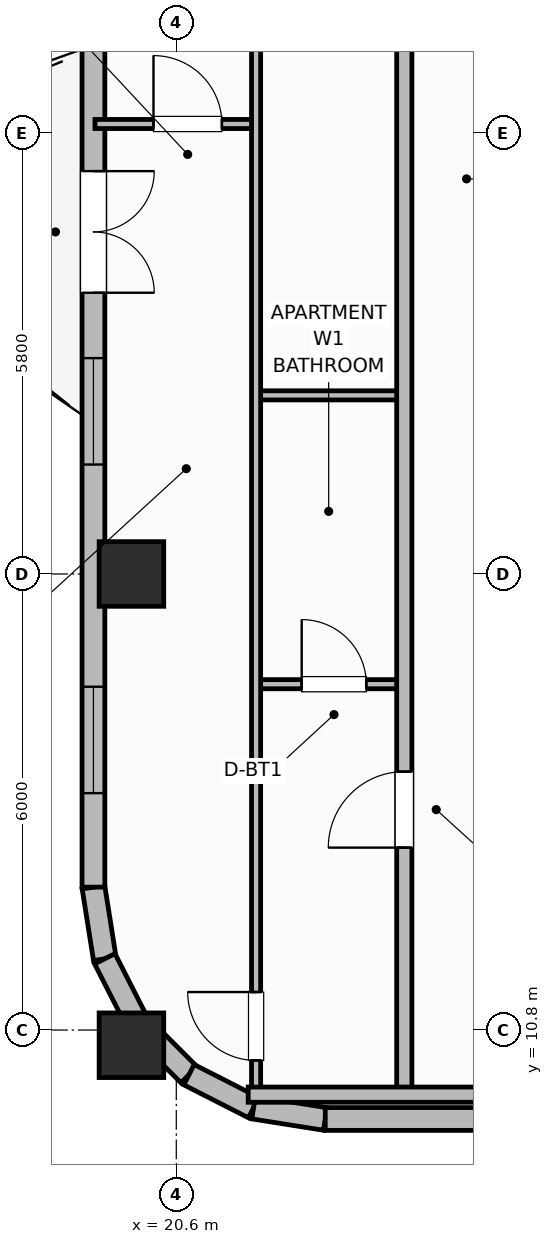
"""IFC4 building model, lengths in metres.
Left out: names, types, materials, properties, quantities, classifications, styles, units other than length and angle.
Written with IfcOpenShell. Run it as: python <this file> out.ifc"""

import sys

from ifc_helpers import new_model, si_unit, direction, frame, frame_2d, origin, origin_2d, place, context, subcontext, project, spatial, rectangle, extrude, element, fill, save


model = new_model("IFC4")
c1 = context("Model", 3, precision=1e-05, world=origin(), true_north=direction((0.0, 1.0)))
c2 = subcontext(c1, "Body", "Model", "MODEL_VIEW")
j1 = project(units=[si_unit("LENGTHUNIT", "METRE"), si_unit("PLANEANGLEUNIT", "RADIAN")], contexts=[c1])
p1 = place(None, origin())
s1 = spatial("IfcSite", under=j1, at=p1, CompositionType="ELEMENT")
p2 = place(p1, origin())
s2 = spatial("IfcBuilding", under=s1, at=p2, CompositionType="ELEMENT")
p3 = place(p2, frame((0.0, 0.0, 248.0)))
s3 = spatial("IfcBuildingStorey", under=s2, at=p3, CompositionType="ELEMENT", Elevation=248.0)
for number, where, z_axis, x_axis in (
    (1, (20.01, 10.6, 0.0), (0.0, 0.0, 1.0), (1.0, 0.0, 0.0)),
    (2, (20.01, 16.8, 0.0), (0.0, 0.0, 1.0), (1.0, 0.0, 0.0)),
):
    element("IfcColumn", number, at=place(p3, frame(where, z_axis=z_axis, x_axis=x_axis)), inside=s3, PredefinedType="COLUMN", context=c2, shape_type="SweptSolid", body=[
        extrude(rectangle(XDim=0.85, YDim=0.85, at=origin_2d()), origin(), (0.0, 0.0, 1.0), 3.7),
    ])
p4 = place(p3, frame((19.51, 12.68, 0.0), z_axis=(0.0, 0.0, 1.0), x_axis=(0.156343617883, -0.987702725088, 0.0)))
e3 = element("IfcWall", 3, at=p4, inside=s3, PredefinedType="SOLIDWALL", context=c2, shape_type="SweptSolid", body=[
    extrude(rectangle(XDim=0.954, YDim=0.3, at=frame_2d((0.477, 0.0))), origin(), (0.0, 0.0, 1.0), 2.73),
])
for number, where, z_axis, x_axis in (
    (4, (19.659, 11.738, 0.0), (0.0, 0.0, 1.0), (0.454, -0.891, 0.0)),
    (5, (20.093, 10.887, 0.0), (0.0, 0.0, 1.0), (0.707, -0.707, 0.0)),
):
    element("IfcWall", number, at=place(p3, frame(where, z_axis=z_axis, x_axis=x_axis)), inside=s3, PredefinedType="SOLIDWALL", context=c2, shape_type="SweptSolid", body=[
        extrude(rectangle(XDim=0.954, YDim=0.3, at=frame_2d((0.477, 0.0))), origin(), (0.0, 0.0, 1.0), 2.73),
    ])
p5 = place(p3, frame((20.767, 10.212, 0.0), z_axis=(0.0, 0.0, 1.0), x_axis=(0.891023873617, -0.45395644796, 0.0)))
e6 = element("IfcWall", 6, at=p5, inside=s3, PredefinedType="SOLIDWALL", context=c2, shape_type="SweptSolid", body=[
    extrude(rectangle(XDim=0.954, YDim=0.3, at=frame_2d((0.477, 0.0))), origin(), (0.0, 0.0, 1.0), 2.73),
])
p6 = place(p3, frame((21.617, 9.779, 0.0), z_axis=(0.0, 0.0, 1.0), x_axis=(0.987669453596, -0.156553666304, 0.0)))
e7 = element("IfcWall", 7, at=p6, inside=s3, PredefinedType="SOLIDWALL", context=c2, shape_type="SweptSolid", body=[
    extrude(rectangle(XDim=0.954, YDim=0.3, at=frame_2d((0.477, 0.0))), origin(), (0.0, 0.0, 1.0), 2.73),
])
p7 = place(p3, frame((22.56, 9.63, 0.0), z_axis=(0.0, 0.0, 1.0), x_axis=(1.0, 0.0, 0.0)))
e8 = element("IfcWall", 8, at=p7, inside=s3, PredefinedType="SOLIDWALL", context=c2, shape_type="SweptSolid", body=[
    extrude(rectangle(XDim=33.28, YDim=0.3, at=frame_2d((16.64, 0.0))), origin(), (0.0, 0.0, 1.0), 2.73),
])
p8 = place(p7, frame((4.311, 0.0, 0.76)))
e9 = element("IfcOpeningElement", 9, at=p8, cuts=e8, PredefinedType="OPENING", context=c2, shape_type="SweptSolid", body=[
    extrude(rectangle(XDim=1.4, YDim=1.85, at=frame_2d((0.7, 0.925))), frame((0.0, 0.16, 0.0), z_axis=(0.0, -1.0, 0.0), x_axis=(1.0, 0.0, 0.0)), (0.0, 0.0, 1.0), 0.32),
])
p9 = place(p7, frame((7.218, 0.0, 0.76)))
e10 = element("IfcOpeningElement", 10, at=p9, cuts=e8, PredefinedType="OPENING", context=c2, shape_type="SweptSolid", body=[
    extrude(rectangle(XDim=1.4, YDim=1.85, at=frame_2d((0.7, 0.925))), frame((0.0, 0.16, 0.0), z_axis=(0.0, -1.0, 0.0), x_axis=(1.0, 0.0, 0.0)), (0.0, 0.0, 1.0), 0.32),
])
p10 = place(p7, frame((9.775, 0.0, 0.76)))
e11 = element("IfcOpeningElement", 11, at=p10, cuts=e8, PredefinedType="OPENING", context=c2, shape_type="SweptSolid", body=[
    extrude(rectangle(XDim=1.4, YDim=1.85, at=frame_2d((0.7, 0.925))), frame((0.0, 0.16, 0.0), z_axis=(0.0, -1.0, 0.0), x_axis=(1.0, 0.0, 0.0)), (0.0, 0.0, 1.0), 0.32),
])
p11 = place(p7, frame((14.083, 0.0, 0.76)))
e12 = element("IfcOpeningElement", 12, at=p11, cuts=e8, PredefinedType="OPENING", context=c2, shape_type="SweptSolid", body=[
    extrude(rectangle(XDim=1.4, YDim=1.85, at=frame_2d((0.7, 0.925))), frame((0.0, 0.16, 0.0), z_axis=(0.0, -1.0, 0.0), x_axis=(1.0, 0.0, 0.0)), (0.0, 0.0, 1.0), 0.32),
])
p12 = place(p7, frame((15.94, 0.0, 0.76)))
e13 = element("IfcOpeningElement", 13, at=p12, cuts=e8, PredefinedType="OPENING", context=c2, shape_type="SweptSolid", body=[
    extrude(rectangle(XDim=1.4, YDim=1.85, at=frame_2d((0.7, 0.925))), frame((0.0, 0.16, 0.0), z_axis=(0.0, -1.0, 0.0), x_axis=(1.0, 0.0, 0.0)), (0.0, 0.0, 1.0), 0.32),
])
p13 = place(p7, frame((17.797, 0.0, 0.76)))
e14 = element("IfcOpeningElement", 14, at=p13, cuts=e8, PredefinedType="OPENING", context=c2, shape_type="SweptSolid", body=[
    extrude(rectangle(XDim=1.4, YDim=1.85, at=frame_2d((0.7, 0.925))), frame((0.0, 0.16, 0.0), z_axis=(0.0, -1.0, 0.0), x_axis=(1.0, 0.0, 0.0)), (0.0, 0.0, 1.0), 0.32),
])
p14 = place(p7, frame((22.104, 0.0, 0.76)))
e15 = element("IfcOpeningElement", 15, at=p14, cuts=e8, PredefinedType="OPENING", context=c2, shape_type="SweptSolid", body=[
    extrude(rectangle(XDim=1.4, YDim=1.85, at=frame_2d((0.7, 0.925))), frame((0.0, 0.16, 0.0), z_axis=(0.0, -1.0, 0.0), x_axis=(1.0, 0.0, 0.0)), (0.0, 0.0, 1.0), 0.32),
])
p15 = place(p7, frame((24.662, 0.0, 0.76)))
e16 = element("IfcOpeningElement", 16, at=p15, cuts=e8, PredefinedType="OPENING", context=c2, shape_type="SweptSolid", body=[
    extrude(rectangle(XDim=1.4, YDim=1.85, at=frame_2d((0.7, 0.925))), frame((0.0, 0.16, 0.0), z_axis=(0.0, -1.0, 0.0), x_axis=(1.0, 0.0, 0.0)), (0.0, 0.0, 1.0), 0.32),
])
p16 = place(p7, frame((27.569, 0.0, 0.76)))
e17 = element("IfcOpeningElement", 17, at=p16, cuts=e8, PredefinedType="OPENING", context=c2, shape_type="SweptSolid", body=[
    extrude(rectangle(XDim=1.4, YDim=1.85, at=frame_2d((0.7, 0.925))), frame((0.0, 0.16, 0.0), z_axis=(0.0, -1.0, 0.0), x_axis=(1.0, 0.0, 0.0)), (0.0, 0.0, 1.0), 0.32),
])
p17 = place(p3, frame((19.51, 23.8, 0.0), z_axis=(0.0, 0.0, 1.0), x_axis=(0.0, -1.0, 0.0)))
e18 = element("IfcWall", 18, at=p17, inside=s3, PredefinedType="SOLIDWALL", context=c2, shape_type="SweptSolid", body=[
    extrude(rectangle(XDim=11.12, YDim=0.3, at=frame_2d((5.56, 0.0))), origin(), (0.0, 0.0, 1.0), 2.73),
])
p18 = place(p17, frame((1.7, 0.0, 0.0)))
e19 = element("IfcOpeningElement", 19, at=p18, cuts=e18, PredefinedType="OPENING", context=c2, shape_type="SweptSolid", body=[
    extrude(rectangle(XDim=1.6, YDim=2.1, at=frame_2d((0.8, 1.05))), frame((0.0, 0.16, 0.0), z_axis=(0.0, -1.0, 0.0), x_axis=(1.0, 0.0, 0.0)), (0.0, 0.0, 1.0), 0.32),
])
p19 = place(p17, frame((4.16, 0.0, 0.76)))
e20 = element("IfcOpeningElement", 20, at=p19, cuts=e18, PredefinedType="OPENING", context=c2, shape_type="SweptSolid", body=[
    extrude(rectangle(XDim=1.4, YDim=1.85, at=frame_2d((0.7, 0.925))), frame((0.0, 0.16, 0.0), z_axis=(0.0, -1.0, 0.0), x_axis=(1.0, 0.0, 0.0)), (0.0, 0.0, 1.0), 0.32),
])
p20 = place(p17, frame((8.483, 0.0, 0.76)))
e21 = element("IfcOpeningElement", 21, at=p20, cuts=e18, PredefinedType="OPENING", context=c2, shape_type="SweptSolid", body=[
    extrude(rectangle(XDim=1.4, YDim=1.85, at=frame_2d((0.7, 0.925))), frame((0.0, 0.16, 0.0), z_axis=(0.0, -1.0, 0.0), x_axis=(1.0, 0.0, 0.0)), (0.0, 0.0, 1.0), 0.32),
])
p21 = place(p3, frame((21.65, 15.35, 0.0), z_axis=(0.0, 0.0, 1.0), x_axis=(1.0, 0.0, 0.0)))
e22 = element("IfcWall", 22, at=p21, inside=s3, PredefinedType="PARTITIONING", context=c2, shape_type="SweptSolid", body=[
    extrude(rectangle(XDim=1.95, YDim=0.12, at=frame_2d((0.975, 0.0))), origin(), (0.0, 0.0, 1.0), 2.56),
])
p22 = place(p21, frame((0.6, 0.0, 0.0)))
e23 = element("IfcOpeningElement", 23, at=p22, cuts=e22, PredefinedType="OPENING", context=c2, shape_type="SweptSolid", body=[
    extrude(rectangle(XDim=0.85, YDim=2.1, at=frame_2d((0.425, 1.05))), frame((0.0, 0.07, 0.0), z_axis=(0.0, -1.0, 0.0), x_axis=(1.0, 0.0, 0.0)), (0.0, 0.0, 1.0), 0.14),
])
p23 = place(p3, frame((21.65, 19.15, 0.0), z_axis=(0.0, 0.0, 1.0), x_axis=(1.0, 0.0, 0.0)))
e24 = element("IfcWall", 24, at=p23, inside=s3, PredefinedType="PARTITIONING", context=c2, shape_type="SweptSolid", body=[
    extrude(rectangle(XDim=1.95, YDim=0.12, at=frame_2d((0.975, 0.0))), origin(), (0.0, 0.0, 1.0), 2.56),
])
p24 = place(p3, frame((19.53, 22.72, 0.0), z_axis=(0.0, 0.0, 1.0), x_axis=(1.0, 0.0, 0.0)))
e25 = element("IfcWall", 25, at=p24, inside=s3, PredefinedType="PARTITIONING", context=c2, shape_type="SweptSolid", body=[
    extrude(rectangle(XDim=2.12, YDim=0.12, at=frame_2d((1.06, 0.0))), origin(), (0.0, 0.0, 1.0), 2.56),
])
p25 = place(p24, frame((0.77, 0.0, 0.0)))
e26 = element("IfcOpeningElement", 26, at=p25, cuts=e25, PredefinedType="OPENING", context=c2, shape_type="SweptSolid", body=[
    extrude(rectangle(XDim=0.9, YDim=2.1, at=frame_2d((0.45, 1.05))), frame((0.0, 0.07, 0.0), z_axis=(0.0, -1.0, 0.0), x_axis=(1.0, 0.0, 0.0)), (0.0, 0.0, 1.0), 0.14),
])
p26 = place(p3, frame((21.65, 9.99, 0.0), z_axis=(0.0, 0.0, 1.0), x_axis=(0.0, 1.0, 0.0)))
e27 = element("IfcWall", 27, at=p26, inside=s3, PredefinedType="PARTITIONING", context=c2, shape_type="SweptSolid", body=[
    extrude(rectangle(XDim=22.72, YDim=0.12, at=frame_2d((11.36, 0.0))), origin(), (0.0, 0.0, 1.0), 2.56),
])
p27 = place(p26, frame((0.41, 0.0, 0.0)))
e28 = element("IfcOpeningElement", 28, at=p27, cuts=e27, PredefinedType="OPENING", context=c2, shape_type="SweptSolid", body=[
    extrude(rectangle(XDim=0.9, YDim=2.1, at=frame_2d((0.45, 1.05))), frame((0.0, 0.07, 0.0), z_axis=(0.0, -1.0, 0.0), x_axis=(1.0, 0.0, 0.0)), (0.0, 0.0, 1.0), 0.14),
])
p28 = place(p26, frame((15.535, 0.0, 0.0)))
e29 = element("IfcOpeningElement", 29, at=p28, cuts=e27, PredefinedType="OPENING", context=c2, shape_type="SweptSolid", body=[
    extrude(rectangle(XDim=0.82, YDim=2.08, at=frame_2d((0.41, 1.04))), frame((0.0, 0.07, 0.0), z_axis=(0.0, -1.0, 0.0), x_axis=(1.0, 0.0, 0.0)), (0.0, 0.0, 1.0), 0.14),
])
p29 = place(p3, frame((23.6, 9.95, 0.0), z_axis=(0.0, 0.0, 1.0), x_axis=(0.0, 1.0, 0.0)))
e30 = element("IfcWall", 30, at=p29, inside=s3, PredefinedType="PARTITIONING", context=c2, shape_type="SweptSolid", body=[
    extrude(rectangle(XDim=36.5, YDim=0.2, at=frame_2d((18.25, 0.0))), origin(), (0.0, 0.0, 1.0), 2.56),
])
p30 = place(p29, frame((3.25, 0.0, 0.0)))
e31 = element("IfcOpeningElement", 31, at=p30, cuts=e30, PredefinedType="OPENING", context=c2, shape_type="SweptSolid", body=[
    extrude(rectangle(XDim=1.0, YDim=2.15, at=frame_2d((0.5, 1.075))), frame((0.0, 0.11, 0.0), z_axis=(0.0, -1.0, 0.0), x_axis=(1.0, 0.0, 0.0)), (0.0, 0.0, 1.0), 0.22),
])
p31 = place(p29, frame((23.5, 0.0, 0.0)))
e32 = element("IfcOpeningElement", 32, at=p31, cuts=e30, PredefinedType="OPENING", context=c2, shape_type="SweptSolid", body=[
    extrude(rectangle(XDim=1.0, YDim=2.15, at=frame_2d((0.5, 1.075))), frame((0.0, 0.11, 0.0), z_axis=(0.0, -1.0, 0.0), x_axis=(1.0, 0.0, 0.0)), (0.0, 0.0, 1.0), 0.22),
])
p32 = place(p3, frame((21.546, 9.95, 0.0), z_axis=(0.0, 0.0, 1.0), x_axis=(1.0, 0.0, 0.0)))
e33 = element("IfcWall", 33, at=p32, inside=s3, PredefinedType="PARTITIONING", context=c2, shape_type="SweptSolid", body=[
    extrude(rectangle(XDim=3.754, YDim=0.2, at=frame_2d((1.877, 0.0))), origin(), (0.0, 0.0, 1.0), 2.56),
])
p33 = place(p18, origin())
e34 = element("IfcDoor", 34, at=p33, inside=s3, OperationType="DOUBLE_DOOR_SINGLE_SWING", PredefinedType="DOOR", context=c2, shape_type="SweptSolid", body=[
    extrude(rectangle(XDim=1.6, YDim=2.1, at=frame_2d((0.8, 1.05))), frame((0.0, 0.025, 0.0), z_axis=(0.0, -1.0, 0.0), x_axis=(1.0, 0.0, 0.0)), (0.0, 0.0, 1.0), 0.05),
])
fill(e19, e34)
p34 = place(p19, origin())
e35 = element("IfcWindow", 35, at=p34, inside=s3, PartitioningType="SINGLE_PANEL", PredefinedType="WINDOW", context=c2, shape_type="SweptSolid", body=[
    extrude(rectangle(XDim=1.4, YDim=1.85, at=frame_2d((0.7, 0.925))), frame((0.0, 0.03, 0.0), z_axis=(0.0, -1.0, 0.0), x_axis=(1.0, 0.0, 0.0)), (0.0, 0.0, 1.0), 0.06),
])
fill(e20, e35)
p35 = place(p20, origin())
e36 = element("IfcWindow", 36, at=p35, inside=s3, PartitioningType="SINGLE_PANEL", PredefinedType="WINDOW", context=c2, shape_type="SweptSolid", body=[
    extrude(rectangle(XDim=1.4, YDim=1.85, at=frame_2d((0.7, 0.925))), frame((0.0, 0.03, 0.0), z_axis=(0.0, -1.0, 0.0), x_axis=(1.0, 0.0, 0.0)), (0.0, 0.0, 1.0), 0.06),
])
fill(e21, e36)
p36 = place(p22, origin())
e37 = element("IfcDoor", 37, at=p36, inside=s3, OperationType="SINGLE_SWING_LEFT", PredefinedType="DOOR", context=c2, shape_type="SweptSolid", body=[
    extrude(rectangle(XDim=0.85, YDim=2.1, at=frame_2d((0.425, 1.05))), frame((0.0, 0.025, 0.0), z_axis=(0.0, -1.0, 0.0), x_axis=(1.0, 0.0, 0.0)), (0.0, 0.0, 1.0), 0.05),
])
fill(e23, e37)
p37 = place(p25, origin())
e38 = element("IfcDoor", 38, at=p37, inside=s3, OperationType="SINGLE_SWING_LEFT", PredefinedType="DOOR", context=c2, shape_type="SweptSolid", body=[
    extrude(rectangle(XDim=0.9, YDim=2.1, at=frame_2d((0.45, 1.05))), frame((0.0, 0.025, 0.0), z_axis=(0.0, -1.0, 0.0), x_axis=(1.0, 0.0, 0.0)), (0.0, 0.0, 1.0), 0.05),
])
fill(e26, e38)
p38 = place(p27, origin())
e39 = element("IfcDoor", 39, at=p38, inside=s3, OperationType="SINGLE_SWING_RIGHT", PredefinedType="DOOR", context=c2, shape_type="SweptSolid", body=[
    extrude(rectangle(XDim=0.9, YDim=2.1, at=frame_2d((0.45, 1.05))), frame((0.0, 0.025, 0.0), z_axis=(0.0, -1.0, 0.0), x_axis=(1.0, 0.0, 0.0)), (0.0, 0.0, 1.0), 0.05),
])
fill(e28, e39)
p39 = place(p30, origin())
e40 = element("IfcDoor", 40, at=p39, inside=s3, OperationType="SINGLE_SWING_LEFT", PredefinedType="DOOR", context=c2, shape_type="SweptSolid", body=[
    extrude(rectangle(XDim=1.0, YDim=2.15, at=frame_2d((0.5, 1.075))), frame((0.0, 0.025, 0.0), z_axis=(0.0, -1.0, 0.0), x_axis=(1.0, 0.0, 0.0)), (0.0, 0.0, 1.0), 0.05),
])
fill(e31, e40)
save(model, sys.argv[1])
